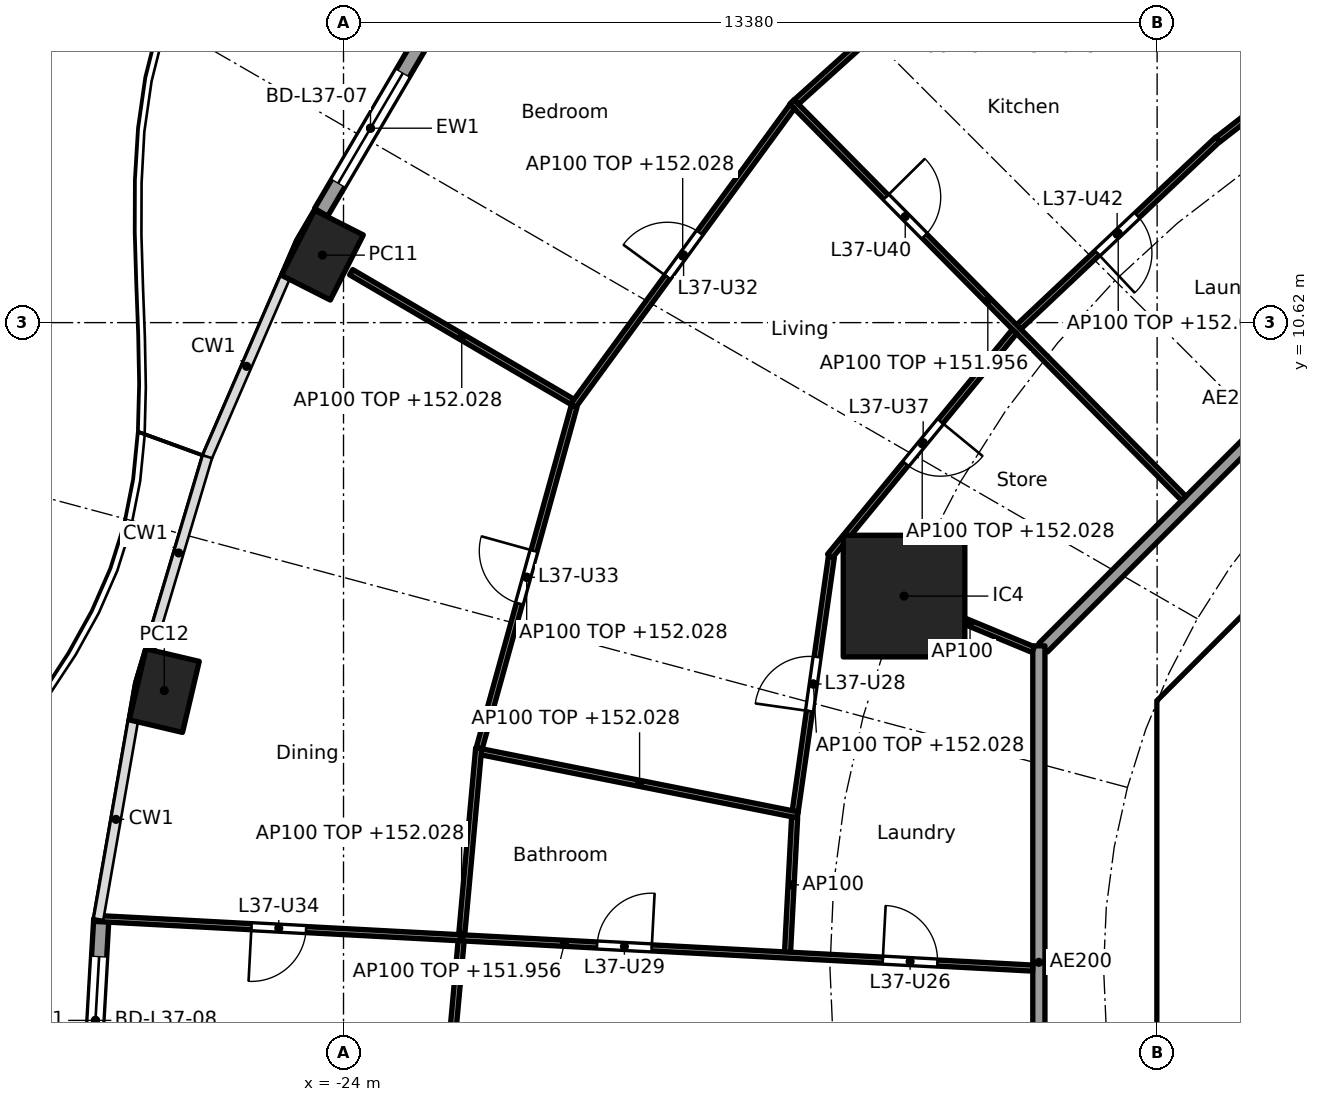
"""IFC4 building model, lengths in metres.
Left out: names, types, materials, properties, quantities, classifications, styles, units other than length and angle.
Written with IfcOpenShell. Run it as: python <this file> out.ifc"""

import sys

from ifc_helpers import new_model, si_unit, direction, frame, frame_2d, origin, origin_2d, place, context, subcontext, project, spatial, polyline, rectangle, hollow_rectangle, outline, extrude, element, fill, save


model = new_model("IFC4")
c1 = context("Model", 3, precision=1e-05, world=origin(), true_north=direction((0.0, 1.0)))
c2 = subcontext(c1, "Body", "Model", "MODEL_VIEW")
j1 = project(units=[si_unit("LENGTHUNIT", "METRE"), si_unit("PLANEANGLEUNIT", "RADIAN")], contexts=[c1])
p1 = place(None, origin())
s1 = spatial("IfcSite", under=j1, at=p1, CompositionType="ELEMENT")
p2 = place(p1, origin())
s2 = spatial("IfcBuilding", under=s1, at=p2, CompositionType="ELEMENT")
p3 = place(p2, frame((0.0, 0.0, 149.2)))
s3 = spatial("IfcBuildingStorey", under=s2, at=p3, CompositionType="ELEMENT", Elevation=149.2)
for number, where, z_axis, x_axis in (
    (1, (-24.347, 11.73, 0.0), (0.0, 0.0, 1.0), (-0.452, -0.892, 0.0)),
    (2, (-26.948, 4.568, 0.0), (0.0, 0.0, 1.0), (-0.229, -0.973, 0.0)),
):
    element("IfcColumn", number, at=place(p3, frame(where, z_axis=z_axis, x_axis=x_axis)), inside=s3, PredefinedType="COLUMN", context=c2, shape_type="SweptSolid", body=[
        extrude(hollow_rectangle(XDim=1.2, YDim=0.9, WallThickness=0.04, at=origin_2d()), origin(), (0.0, 0.0, 1.0), 3.7),
    ])
p4 = place(p3, frame((-14.782, 6.123, 0.0), z_axis=(0.0, 0.0, 1.0), x_axis=(1.0, 0.0, 0.0)))
e3 = element("IfcColumn", 3, at=p4, inside=s3, PredefinedType="COLUMN", context=c2, shape_type="SweptSolid", body=[
    extrude(rectangle(XDim=2.0, YDim=2.0, at=origin_2d()), origin(), (0.0, 0.0, 1.0), 3.7),
])
p5 = place(p3, frame((-24.368, 12.434, 0.0), z_axis=(0.0, 0.0, 1.0), x_axis=(0.506314982873, 0.862348617508, 0.0)))
e4 = element("IfcWall", 4, at=p5, inside=s3, PredefinedType="SOLIDWALL", context=c2, shape_type="SweptSolid", body=[
    extrude(rectangle(XDim=3.208, YDim=0.25, at=frame_2d((1.604, 0.0))), origin(), (0.0, 0.0, 1.0), 3.44),
])
p6 = place(p5, frame((0.554, 0.0, 0.0)))
e5 = element("IfcOpeningElement", 5, at=p6, cuts=e4, PredefinedType="OPENING", context=c2, shape_type="SweptSolid", body=[
    extrude(rectangle(XDim=2.1, YDim=2.4, at=frame_2d((1.05, 1.2))), frame((0.0, 0.135, 0.0), z_axis=(0.0, -1.0, 0.0), x_axis=(1.0, 0.0, 0.0)), (0.0, 0.0, 1.0), 0.27),
])
p7 = place(p3, frame((-28.176, -2.526, 0.0), z_axis=(0.0, 0.0, 1.0), x_axis=(0.057537829427, 0.998343326809, 0.0)))
e6 = element("IfcWall", 6, at=p7, inside=s3, PredefinedType="SOLIDWALL", context=c2, shape_type="SweptSolid", body=[
    extrude(rectangle(XDim=3.348, YDim=0.25, at=frame_2d((1.674, 0.0))), origin(), (0.0, 0.0, 1.0), 3.44),
])
p8 = place(p7, frame((0.624, 0.0, 0.0)))
e7 = element("IfcOpeningElement", 7, at=p8, cuts=e6, PredefinedType="OPENING", context=c2, shape_type="SweptSolid", body=[
    extrude(rectangle(XDim=2.1, YDim=2.4, at=frame_2d((1.05, 1.2))), frame((0.0, 0.135, 0.0), z_axis=(0.0, -1.0, 0.0), x_axis=(1.0, 0.0, 0.0)), (0.0, 0.0, 1.0), 0.27),
])
p9 = place(p3, frame((-4.613, 9.988, 0.0), z_axis=(0.0, 0.0, 1.0), x_axis=(-0.707106781187, -0.707106781187, 0.0)))
e8 = element("IfcWall", 8, at=p9, inside=s3, PredefinedType="SHEAR", context=c2, shape_type="SweptSolid", body=[
    extrude(rectangle(XDim=7.602, YDim=0.6, at=frame_2d((3.801, 0.0))), origin(), (0.0, 0.0, 1.0), 3.44),
])
p10 = place(p9, frame((0.351, 0.0, 0.0)))
e9 = element("IfcOpeningElement", 9, at=p10, cuts=e8, PredefinedType="OPENING", context=c2, shape_type="SweptSolid", body=[
    extrude(rectangle(XDim=1.1, YDim=2.1, at=frame_2d((0.55, 1.05))), frame((0.0, 0.31, 0.0), z_axis=(0.0, -1.0, 0.0), x_axis=(1.0, 0.0, 0.0)), (0.0, 0.0, 1.0), 0.62),
])
p11 = place(p3, frame((-10.325, 3.801, 0.0), z_axis=(0.0, 0.0, 1.0), x_axis=(0.0, -1.0, 0.0)))
e10 = element("IfcWall", 10, at=p11, inside=s3, PredefinedType="SHEAR", context=c2, shape_type="SweptSolid", body=[
    extrude(rectangle(XDim=7.602, YDim=0.6, at=frame_2d((3.801, 0.0))), origin(), (0.0, 0.0, 1.0), 3.44),
])
p12 = place(p11, frame((0.651, 0.0, 0.0)))
e11 = element("IfcOpeningElement", 11, at=p12, cuts=e10, PredefinedType="OPENING", context=c2, shape_type="SweptSolid", body=[
    extrude(rectangle(XDim=1.5, YDim=2.1, at=frame_2d((0.75, 1.05))), frame((0.0, 0.31, 0.0), z_axis=(0.0, -1.0, 0.0), x_axis=(1.0, 0.0, 0.0)), (0.0, 0.0, 1.0), 0.62),
])
p13 = place(p11, frame((5.451, 0.0, 0.0)))
e12 = element("IfcOpeningElement", 12, at=p13, cuts=e10, PredefinedType="OPENING", context=c2, shape_type="SweptSolid", body=[
    extrude(rectangle(XDim=1.5, YDim=2.1, at=frame_2d((0.75, 1.05))), frame((0.0, 0.31, 0.0), z_axis=(0.0, -1.0, 0.0), x_axis=(1.0, 0.0, 0.0)), (0.0, 0.0, 1.0), 0.62),
])
p14 = place(p3, origin())
e13 = element("IfcWall", 13, at=p14, inside=s3, PredefinedType="SHEAR", context=c2, shape_type="SweptSolid", body=[
    extrude(outline(polyline([(-10.2, 4.825), (-9.776, 4.401), (-10.025, 4.152), (-10.025, 3.801), (-10.625, 3.801), (-10.625, 4.401), (-10.2, 4.825)])), origin(), (0.0, 0.0, 1.0), 3.44),
])
p15 = place(p3, frame((-10.025, 4.0, 0.0), z_axis=(0.0, 0.0, 1.0), x_axis=(1.0, 0.0, 0.0)))
e14 = element("IfcWall", 14, at=p15, inside=s3, PredefinedType="PARTITIONING", context=c2, shape_type="SweptSolid", body=[
    extrude(rectangle(XDim=3.325, YDim=0.2, at=frame_2d((1.662, 0.0))), origin(), (0.0, 0.0, 1.0), 3.44),
])
p16 = place(p3, frame((-5.275, 12.494, 0.0), z_axis=(0.0, 0.0, 1.0), x_axis=(-0.707106781187, -0.707106781187, 0.0)))
e15 = element("IfcWall", 15, at=p16, inside=s3, PredefinedType="PARTITIONING", context=c2, shape_type="SweptSolid", body=[
    extrude(rectangle(XDim=10.209, YDim=0.2, at=frame_2d((5.104, 0.0))), origin(), (0.0, 0.0, 1.0), 3.44),
])
p17 = place(p3, frame((-12.565, 5.304, 0.0), z_axis=(0.0, 0.0, 1.0), x_axis=(0.0, -1.0, 0.0)))
e16 = element("IfcWall", 16, at=p17, inside=s3, PredefinedType="PARTITIONING", context=c2, shape_type="SweptSolid", body=[
    extrude(rectangle(XDim=10.409, YDim=0.2, at=frame_2d((5.205, 0.0))), origin(), (0.0, 0.0, 1.0), 3.44),
])
p18 = place(p17, frame((6.539, 0.0, 0.0)))
e17 = element("IfcOpeningElement", 17, at=p18, cuts=e16, PredefinedType="OPENING", context=c2, shape_type="SweptSolid", body=[
    extrude(rectangle(XDim=1.0, YDim=2.1, at=frame_2d((0.5, 1.05))), frame((0.0, 0.11, 0.0), z_axis=(0.0, -1.0, 0.0), x_axis=(1.0, 0.0, 0.0)), (0.0, 0.0, 1.0), 0.22),
])
p19 = place(p3, frame((-6.463, 16.084, 0.0), z_axis=(0.0, 0.0, 1.0), x_axis=(-0.789457442969, -0.613805299538, 0.0)))
e18 = element("IfcWall", 18, at=p19, inside=s3, PredefinedType="PARTITIONING", context=c2, shape_type="SweptSolid", body=[
    extrude(rectangle(XDim=3.997, YDim=0.1, at=frame_2d((1.999, 0.0))), origin(), (0.0, 0.0, 1.0), 2.828),
])
p20 = place(p3, frame((-8.06, 14.904, 0.0), z_axis=(0.0, 0.0, 1.0), x_axis=(-0.367532408503, 0.930010714293, 0.0)))
e19 = element("IfcWall", 19, at=p20, inside=s3, PredefinedType="PARTITIONING", context=c2, shape_type="SweptSolid", body=[
    extrude(rectangle(XDim=4.892, YDim=0.1, at=frame_2d((2.446, 0.0))), origin(), (0.0, 0.0, 1.0), 3.44),
])
p21 = place(p3, frame((-9.622, 13.634, 0.0), z_axis=(0.0, 0.0, 1.0), x_axis=(-0.727710859679, -0.685884031528, 0.0)))
e20 = element("IfcWall", 20, at=p21, inside=s3, PredefinedType="PARTITIONING", context=c2, shape_type="SweptSolid", body=[
    extrude(rectangle(XDim=4.5, YDim=0.1, at=frame_2d((2.25, 0.0))), origin(), (0.0, 0.0, 1.0), 2.828),
])
p22 = place(p21, frame((1.825, 0.0, 0.0)))
e21 = element("IfcOpeningElement", 21, at=p22, cuts=e20, PredefinedType="OPENING", context=c2, shape_type="SweptSolid", body=[
    extrude(rectangle(XDim=0.9, YDim=2.1, at=frame_2d((0.45, 1.05))), frame((0.0, 0.06, 0.0), z_axis=(0.0, -1.0, 0.0), x_axis=(1.0, 0.0, 0.0)), (0.0, 0.0, 1.0), 0.12),
])
p23 = place(p3, frame((-12.215, 18.156, 0.0), z_axis=(0.0, 0.0, 1.0), x_axis=(-0.743159001815, -0.669114861606, 0.0)))
e22 = element("IfcWall", 22, at=p23, inside=s3, PredefinedType="PARTITIONING", context=c2, shape_type="SweptSolid", body=[
    extrude(rectangle(XDim=5.839, YDim=0.1, at=frame_2d((2.92, 0.0))), origin(), (0.0, 0.0, 1.0), 2.828),
])
p24 = place(p23, frame((1.06, 0.0, 0.0)))
e23 = element("IfcOpeningElement", 23, at=p24, cuts=e22, PredefinedType="OPENING", context=c2, shape_type="SweptSolid", body=[
    extrude(rectangle(XDim=0.9, YDim=2.1, at=frame_2d((0.45, 1.05))), frame((0.0, 0.06, 0.0), z_axis=(0.0, -1.0, 0.0), x_axis=(1.0, 0.0, 0.0)), (0.0, 0.0, 1.0), 0.12),
])
p25 = place(p3, frame((-10.182, 7.729, 0.0), z_axis=(0.0, 0.0, 1.0), x_axis=(-0.702927211734, 0.711261790766, 0.0)))
e24 = element("IfcWall", 24, at=p25, inside=s3, PredefinedType="PARTITIONING", context=c2, shape_type="SweptSolid", body=[
    extrude(rectangle(XDim=9.168, YDim=0.1, at=frame_2d((4.584, 0.0))), origin(), (0.0, 0.0, 1.0), 2.756),
])
p26 = place(p25, frame((6.067, 0.0, 0.0)))
e25 = element("IfcOpeningElement", 25, at=p26, cuts=e24, PredefinedType="OPENING", context=c2, shape_type="SweptSolid", body=[
    extrude(rectangle(XDim=0.9, YDim=2.1, at=frame_2d((0.45, 1.05))), frame((0.0, 0.06, 0.0), z_axis=(0.0, -1.0, 0.0), x_axis=(1.0, 0.0, 0.0)), (0.0, 0.0, 1.0), 0.12),
])
p27 = place(p3, frame((-12.965, 10.475, 0.0), z_axis=(0.0, 0.0, 1.0), x_axis=(-0.634932102074, -0.772567942485, 0.0)))
e26 = element("IfcWall", 26, at=p27, inside=s3, PredefinedType="PARTITIONING", context=c2, shape_type="SweptSolid", body=[
    extrude(rectangle(XDim=4.782, YDim=0.1, at=frame_2d((2.391, 0.0))), origin(), (0.0, 0.0, 1.0), 2.828),
])
p28 = place(p27, frame((1.916, 0.0, 0.0)))
e27 = element("IfcOpeningElement", 27, at=p28, cuts=e26, PredefinedType="OPENING", context=c2, shape_type="SweptSolid", body=[
    extrude(rectangle(XDim=0.9, YDim=2.1, at=frame_2d((0.45, 1.05))), frame((0.0, 0.06, 0.0), z_axis=(0.0, -1.0, 0.0), x_axis=(1.0, 0.0, 0.0)), (0.0, 0.0, 1.0), 0.12),
])
p29 = place(p3, frame((-16.621, 14.174, 0.0), z_axis=(0.0, 0.0, 1.0), x_axis=(-0.590672767272, -0.806911198338, 0.0)))
e28 = element("IfcWall", 28, at=p29, inside=s3, PredefinedType="PARTITIONING", context=c2, shape_type="SweptSolid", body=[
    extrude(rectangle(XDim=6.099, YDim=0.1, at=frame_2d((3.05, 0.0))), origin(), (0.0, 0.0, 1.0), 2.828),
])
p30 = place(p29, frame((2.574, 0.0, 0.0)))
e29 = element("IfcOpeningElement", 29, at=p30, cuts=e28, PredefinedType="OPENING", context=c2, shape_type="SweptSolid", body=[
    extrude(rectangle(XDim=0.9, YDim=2.1, at=frame_2d((0.45, 1.05))), frame((0.0, 0.06, 0.0), z_axis=(0.0, -1.0, 0.0), x_axis=(1.0, 0.0, 0.0)), (0.0, 0.0, 1.0), 0.12),
])
p31 = place(p3, frame((-12.657, 5.243, 0.0), z_axis=(0.0, 0.0, 1.0), x_axis=(-0.923864733477, 0.382719158442, 0.0)))
e30 = element("IfcWall", 30, at=p31, inside=s3, PredefinedType="PARTITIONING", context=c2, shape_type="SweptSolid", body=[
    extrude(rectangle(XDim=2.25, YDim=0.1, at=frame_2d((1.125, 0.0))), origin(), (0.0, 0.0, 1.0), 3.44),
])
p32 = place(p3, frame((-15.977, 6.769, 0.0), z_axis=(0.0, 0.0, 1.0), x_axis=(-0.140693592547, -0.990053186963, 0.0)))
e31 = element("IfcWall", 31, at=p32, inside=s3, PredefinedType="PARTITIONING", context=c2, shape_type="SweptSolid", body=[
    extrude(rectangle(XDim=4.227, YDim=0.1, at=frame_2d((2.114, 0.0))), origin(), (0.0, 0.0, 1.0), 2.828),
])
p33 = place(p32, frame((1.664, 0.0, 0.0)))
e32 = element("IfcOpeningElement", 32, at=p33, cuts=e31, PredefinedType="OPENING", context=c2, shape_type="SweptSolid", body=[
    extrude(rectangle(XDim=0.9, YDim=2.1, at=frame_2d((0.45, 1.05))), frame((0.0, 0.06, 0.0), z_axis=(0.0, -1.0, 0.0), x_axis=(1.0, 0.0, 0.0)), (0.0, 0.0, 1.0), 0.12),
])
p34 = place(p3, frame((-20.237, 9.319, 0.0), z_axis=(0.0, 0.0, 1.0), x_axis=(-0.862867843769, 0.505429603593, 0.0)))
e33 = element("IfcWall", 33, at=p34, inside=s3, PredefinedType="PARTITIONING", context=c2, shape_type="SweptSolid", body=[
    extrude(rectangle(XDim=4.215, YDim=0.1, at=frame_2d((2.107, 0.0))), origin(), (0.0, 0.0, 1.0), 2.828),
])
p35 = place(p3, frame((-20.207, 9.245, 0.0), z_axis=(0.0, 0.0, 1.0), x_axis=(-0.267400122135, -0.963585582438, 0.0)))
e34 = element("IfcWall", 34, at=p35, inside=s3, PredefinedType="PARTITIONING", context=c2, shape_type="SweptSolid", body=[
    extrude(rectangle(XDim=5.838, YDim=0.1, at=frame_2d((2.919, 0.0))), origin(), (0.0, 0.0, 1.0), 2.828),
])
p36 = place(p35, frame((2.469, 0.0, 0.0)))
e35 = element("IfcOpeningElement", 35, at=p36, cuts=e34, PredefinedType="OPENING", context=c2, shape_type="SweptSolid", body=[
    extrude(rectangle(XDim=0.9, YDim=2.1, at=frame_2d((0.45, 1.05))), frame((0.0, 0.06, 0.0), z_axis=(0.0, -1.0, 0.0), x_axis=(1.0, 0.0, 0.0)), (0.0, 0.0, 1.0), 0.12),
])
p37 = place(p3, frame((-16.53, 2.525, 0.0), z_axis=(0.0, 0.0, 1.0), x_axis=(-0.980716720387, 0.195434680531, 0.0)))
e36 = element("IfcWall", 36, at=p37, inside=s3, PredefinedType="PARTITIONING", context=c2, shape_type="SweptSolid", body=[
    extrude(rectangle(XDim=5.305, YDim=0.1, at=frame_2d((2.653, 0.0))), origin(), (0.0, 0.0, 1.0), 2.828),
])
p38 = place(p3, frame((-16.581, 2.485, 0.0), z_axis=(0.0, 0.0, 1.0), x_axis=(-0.052455156936, -0.998623280577, 0.0)))
e37 = element("IfcWall", 37, at=p38, inside=s3, PredefinedType="PARTITIONING", context=c2, shape_type="SweptSolid", body=[
    extrude(rectangle(XDim=2.225, YDim=0.1, at=frame_2d((1.112, 0.0))), origin(), (0.0, 0.0, 1.0), 3.44),
])
p39 = place(p3, frame((-21.777, 3.621, 0.0), z_axis=(0.0, 0.0, 1.0), x_axis=(-0.090606877484, -0.995886737412, 0.0)))
e38 = element("IfcWall", 38, at=p39, inside=s3, PredefinedType="PARTITIONING", context=c2, shape_type="SweptSolid", body=[
    extrude(rectangle(XDim=6.189, YDim=0.1, at=frame_2d((3.095, 0.0))), origin(), (0.0, 0.0, 1.0), 2.828),
])
p40 = place(p3, frame((-12.665, 0.005, 0.0), z_axis=(0.0, 0.0, 1.0), x_axis=(-0.998599229025, 0.052911055468, 0.0)))
e39 = element("IfcWall", 39, at=p40, inside=s3, PredefinedType="PARTITIONING", context=c2, shape_type="SweptSolid", body=[
    extrude(rectangle(XDim=15.425, YDim=0.1, at=frame_2d((7.713, 0.0))), origin(), (0.0, 0.0, 1.0), 2.756),
])
p41 = place(p40, frame((1.571, 0.0, 0.0)))
e40 = element("IfcOpeningElement", 40, at=p41, cuts=e39, PredefinedType="OPENING", context=c2, shape_type="SweptSolid", body=[
    extrude(rectangle(XDim=0.9, YDim=2.1, at=frame_2d((0.45, 1.05))), frame((0.0, 0.06, 0.0), z_axis=(0.0, -1.0, 0.0), x_axis=(1.0, 0.0, 0.0)), (0.0, 0.0, 1.0), 0.12),
])
p42 = place(p40, frame((6.276, 0.0, 0.0)))
e41 = element("IfcOpeningElement", 41, at=p42, cuts=e39, PredefinedType="OPENING", context=c2, shape_type="SweptSolid", body=[
    extrude(rectangle(XDim=0.9, YDim=2.1, at=frame_2d((0.45, 1.05))), frame((0.0, 0.06, 0.0), z_axis=(0.0, -1.0, 0.0), x_axis=(1.0, 0.0, 0.0)), (0.0, 0.0, 1.0), 0.12),
])
p43 = place(p40, frame((11.967, 0.0, 0.0)))
e42 = element("IfcOpeningElement", 42, at=p43, cuts=e39, PredefinedType="OPENING", context=c2, shape_type="SweptSolid", body=[
    extrude(rectangle(XDim=0.9, YDim=2.1, at=frame_2d((0.45, 1.05))), frame((0.0, 0.06, 0.0), z_axis=(0.0, -1.0, 0.0), x_axis=(1.0, 0.0, 0.0)), (0.0, 0.0, 1.0), 0.12),
])
p44 = place(p6, origin())
e43 = element("IfcDoor", 43, at=p44, inside=s3, OperationType="SLIDING_TO_LEFT", PredefinedType="DOOR", context=c2, shape_type="SweptSolid", body=[
    extrude(rectangle(XDim=2.1, YDim=2.4, at=frame_2d((1.05, 1.2))), frame((0.0, 0.025, 0.0), z_axis=(0.0, -1.0, 0.0), x_axis=(1.0, 0.0, 0.0)), (0.0, 0.0, 1.0), 0.05),
])
fill(e5, e43)
p45 = place(p8, origin())
e44 = element("IfcDoor", 44, at=p45, inside=s3, OperationType="SLIDING_TO_LEFT", PredefinedType="DOOR", context=c2, shape_type="SweptSolid", body=[
    extrude(rectangle(XDim=2.1, YDim=2.4, at=frame_2d((1.05, 1.2))), frame((0.0, 0.025, 0.0), z_axis=(0.0, -1.0, 0.0), x_axis=(1.0, 0.0, 0.0)), (0.0, 0.0, 1.0), 0.05),
])
fill(e7, e44)
p46 = place(p12, origin())
e45 = element("IfcDoor", 45, at=p46, inside=s3, OperationType="DOUBLE_DOOR_SINGLE_SWING", PredefinedType="DOOR", context=c2, shape_type="SweptSolid", body=[
    extrude(rectangle(XDim=1.5, YDim=2.1, at=frame_2d((0.75, 1.05))), frame((0.0, 0.025, 0.0), z_axis=(0.0, -1.0, 0.0), x_axis=(1.0, 0.0, 0.0)), (0.0, 0.0, 1.0), 0.05),
])
fill(e11, e45)
p47 = place(p41, frame((0.9, 0.0, 0.0), x_axis=(-1.0, 0.0, 0.0)))
e46 = element("IfcDoor", 46, at=p47, inside=s3, OperationType="SINGLE_SWING_LEFT", PredefinedType="DOOR", context=c2, shape_type="SweptSolid", body=[
    extrude(rectangle(XDim=0.9, YDim=2.1, at=frame_2d((0.45, 1.05))), frame((0.0, 0.025, 0.0), z_axis=(0.0, -1.0, 0.0), x_axis=(1.0, 0.0, 0.0)), (0.0, 0.0, 1.0), 0.05),
])
fill(e40, e46)
p48 = place(p33, frame((0.9, 0.0, 0.0), x_axis=(-1.0, 0.0, 0.0)))
e47 = element("IfcDoor", 47, at=p48, inside=s3, OperationType="SINGLE_SWING_LEFT", PredefinedType="DOOR", context=c2, shape_type="SweptSolid", body=[
    extrude(rectangle(XDim=0.9, YDim=2.1, at=frame_2d((0.45, 1.05))), frame((0.0, 0.025, 0.0), z_axis=(0.0, -1.0, 0.0), x_axis=(1.0, 0.0, 0.0)), (0.0, 0.0, 1.0), 0.05),
])
fill(e32, e47)
p49 = place(p42, frame((0.9, 0.0, 0.0), x_axis=(-1.0, 0.0, 0.0)))
e48 = element("IfcDoor", 48, at=p49, inside=s3, OperationType="SINGLE_SWING_RIGHT", PredefinedType="DOOR", context=c2, shape_type="SweptSolid", body=[
    extrude(rectangle(XDim=0.9, YDim=2.1, at=frame_2d((0.45, 1.05))), frame((0.0, 0.025, 0.0), z_axis=(0.0, -1.0, 0.0), x_axis=(1.0, 0.0, 0.0)), (0.0, 0.0, 1.0), 0.05),
])
fill(e41, e48)
p50 = place(p30, frame((0.9, 0.0, 0.0), x_axis=(-1.0, 0.0, 0.0)))
e49 = element("IfcDoor", 49, at=p50, inside=s3, OperationType="SINGLE_SWING_LEFT", PredefinedType="DOOR", context=c2, shape_type="SweptSolid", body=[
    extrude(rectangle(XDim=0.9, YDim=2.1, at=frame_2d((0.45, 1.05))), frame((0.0, 0.025, 0.0), z_axis=(0.0, -1.0, 0.0), x_axis=(1.0, 0.0, 0.0)), (0.0, 0.0, 1.0), 0.05),
])
fill(e29, e49)
p51 = place(p36, frame((0.9, 0.0, 0.0), x_axis=(-1.0, 0.0, 0.0)))
e50 = element("IfcDoor", 50, at=p51, inside=s3, OperationType="SINGLE_SWING_RIGHT", PredefinedType="DOOR", context=c2, shape_type="SweptSolid", body=[
    extrude(rectangle(XDim=0.9, YDim=2.1, at=frame_2d((0.45, 1.05))), frame((0.0, 0.025, 0.0), z_axis=(0.0, -1.0, 0.0), x_axis=(1.0, 0.0, 0.0)), (0.0, 0.0, 1.0), 0.05),
])
fill(e35, e50)
p52 = place(p43, origin())
e51 = element("IfcDoor", 51, at=p52, inside=s3, OperationType="SINGLE_SWING_RIGHT", PredefinedType="DOOR", context=c2, shape_type="SweptSolid", body=[
    extrude(rectangle(XDim=0.9, YDim=2.1, at=frame_2d((0.45, 1.05))), frame((0.0, 0.025, 0.0), z_axis=(0.0, -1.0, 0.0), x_axis=(1.0, 0.0, 0.0)), (0.0, 0.0, 1.0), 0.05),
])
fill(e42, e51)
p53 = place(p28, origin())
e52 = element("IfcDoor", 52, at=p53, inside=s3, OperationType="SINGLE_SWING_LEFT", PredefinedType="DOOR", context=c2, shape_type="SweptSolid", body=[
    extrude(rectangle(XDim=0.9, YDim=2.1, at=frame_2d((0.45, 1.05))), frame((0.0, 0.025, 0.0), z_axis=(0.0, -1.0, 0.0), x_axis=(1.0, 0.0, 0.0)), (0.0, 0.0, 1.0), 0.05),
])
fill(e27, e52)
p54 = place(p26, frame((0.9, 0.0, 0.0), x_axis=(-1.0, 0.0, 0.0)))
e53 = element("IfcDoor", 53, at=p54, inside=s3, OperationType="SINGLE_SWING_LEFT", PredefinedType="DOOR", context=c2, shape_type="SweptSolid", body=[
    extrude(rectangle(XDim=0.9, YDim=2.1, at=frame_2d((0.45, 1.05))), frame((0.0, 0.025, 0.0), z_axis=(0.0, -1.0, 0.0), x_axis=(1.0, 0.0, 0.0)), (0.0, 0.0, 1.0), 0.05),
])
fill(e25, e53)
p55 = place(p22, origin())
e54 = element("IfcDoor", 54, at=p55, inside=s3, OperationType="SINGLE_SWING_RIGHT", PredefinedType="DOOR", context=c2, shape_type="SweptSolid", body=[
    extrude(rectangle(XDim=0.9, YDim=2.1, at=frame_2d((0.45, 1.05))), frame((0.0, 0.025, 0.0), z_axis=(0.0, -1.0, 0.0), x_axis=(1.0, 0.0, 0.0)), (0.0, 0.0, 1.0), 0.05),
])
fill(e21, e54)
save(model, sys.argv[1])
